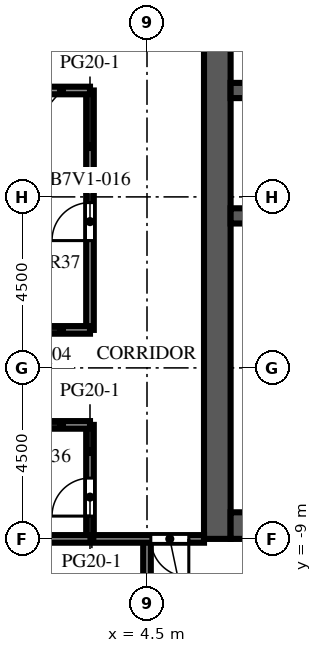
"""IFC4 building model, lengths in metres.
Left out: names, types, materials, properties, quantities, classifications, styles, units other than length and angle.
Written with IfcOpenShell. Run it as: python <this file> out.ifc"""

import sys

from ifc_helpers import new_model, si_unit, direction, frame, frame_2d, origin, place, context, subcontext, project, spatial, rectangle, extrude, element, fill, save


model = new_model("IFC4")
c1 = context("Model", 3, precision=1e-05, world=origin(), true_north=direction((0.0, 1.0)))
c2 = subcontext(c1, "Body", "Model", "MODEL_VIEW")
j1 = project(units=[si_unit("LENGTHUNIT", "METRE"), si_unit("PLANEANGLEUNIT", "RADIAN")], contexts=[c1])
p1 = place(None, origin())
s1 = spatial("IfcSite", under=j1, at=p1, CompositionType="ELEMENT")
p2 = place(p1, origin())
s2 = spatial("IfcBuilding", under=s1, at=p2, CompositionType="ELEMENT")
p3 = place(p2, frame((0.0, 0.0, 248.0)))
s3 = spatial("IfcBuildingStorey", under=s2, at=p3, CompositionType="ELEMENT", Elevation=248.0)
p4 = place(p3, frame((6.35, -9.0, 0.0), z_axis=(0.0, 0.0, 1.0), x_axis=(0.0, 1.0, 0.0)))
e1 = element("IfcWall", 1, at=p4, inside=s3, PredefinedType="SHEAR", context=c2, shape_type="SweptSolid", body=[
    extrude(rectangle(XDim=27.5, YDim=0.7, at=frame_2d((13.75, 0.0))), origin(), (0.0, 0.0, 1.0), 4.1),
])
p5 = place(p4, frame((12.55, 0.0, 0.0)))
e2 = element("IfcOpeningElement", 2, at=p5, cuts=e1, PredefinedType="OPENING", context=c2, shape_type="SweptSolid", body=[
    extrude(rectangle(XDim=2.4, YDim=2.4, at=frame_2d((1.2, 1.2))), frame((0.0, 0.36, 0.0), z_axis=(0.0, -1.0, 0.0), x_axis=(1.0, 0.0, 0.0)), (0.0, 0.0, 1.0), 0.72),
])
p6 = place(p4, frame((3.9, 0.0, 0.0)))
e3 = element("IfcOpeningElement", 3, at=p6, cuts=e1, PredefinedType="OPENING", context=c2, shape_type="SweptSolid", body=[
    extrude(rectangle(XDim=1.2, YDim=2.1, at=frame_2d((0.6, 1.05))), frame((0.0, 0.36, 0.0), z_axis=(0.0, -1.0, 0.0), x_axis=(1.0, 0.0, 0.0)), (0.0, 0.0, 1.0), 0.72),
])
p7 = place(p4, frame((22.4, 0.0, 0.0)))
e4 = element("IfcOpeningElement", 4, at=p7, cuts=e1, PredefinedType="OPENING", context=c2, shape_type="SweptSolid", body=[
    extrude(rectangle(XDim=1.2, YDim=2.1, at=frame_2d((0.6, 1.05))), frame((0.0, 0.36, 0.0), z_axis=(0.0, -1.0, 0.0), x_axis=(1.0, 0.0, 0.0)), (0.0, 0.0, 1.0), 0.72),
])
p8 = place(p3, frame((6.7, -8.65, 0.0), z_axis=(0.0, 0.0, 1.0), x_axis=(1.0, 0.0, 0.0)))
e5 = element("IfcWall", 5, at=p8, inside=s3, PredefinedType="SHEAR", context=c2, shape_type="SweptSolid", body=[
    extrude(rectangle(XDim=10.6, YDim=0.7, at=frame_2d((5.3, 0.0))), origin(), (0.0, 0.0, 1.0), 4.1),
])
p9 = place(p3, frame((6.7, -0.5, 0.0), z_axis=(0.0, 0.0, 1.0), x_axis=(1.0, 0.0, 0.0)))
e6 = element("IfcWall", 6, at=p9, inside=s3, PredefinedType="SHEAR", context=c2, shape_type="SweptSolid", body=[
    extrude(rectangle(XDim=10.6, YDim=0.4, at=frame_2d((5.3, 0.0))), origin(), (0.0, 0.0, 1.0), 4.1),
])
p10 = place(p3, frame((6.7, 2.8, 0.0), z_axis=(0.0, 0.0, 1.0), x_axis=(1.0, 0.0, 0.0)))
e7 = element("IfcWall", 7, at=p10, inside=s3, PredefinedType="SHEAR", context=c2, shape_type="SweptSolid", body=[
    extrude(rectangle(XDim=10.6, YDim=0.4, at=frame_2d((5.3, 0.0))), origin(), (0.0, 0.0, 1.0), 4.1),
])
p11 = place(p10, frame((0.688, 0.0, 0.0)))
e8 = element("IfcOpeningElement", 8, at=p11, cuts=e7, PredefinedType="OPENING", context=c2, shape_type="SweptSolid", body=[
    extrude(rectangle(XDim=1.1, YDim=2.1, at=frame_2d((0.55, 1.05))), frame((0.0, 0.21, 0.0), z_axis=(0.0, -1.0, 0.0), x_axis=(1.0, 0.0, 0.0)), (0.0, 0.0, 1.0), 0.42),
])
p12 = place(p10, frame((3.438, 0.0, 0.0)))
e9 = element("IfcOpeningElement", 9, at=p12, cuts=e7, PredefinedType="OPENING", context=c2, shape_type="SweptSolid", body=[
    extrude(rectangle(XDim=1.1, YDim=2.1, at=frame_2d((0.55, 1.05))), frame((0.0, 0.21, 0.0), z_axis=(0.0, -1.0, 0.0), x_axis=(1.0, 0.0, 0.0)), (0.0, 0.0, 1.0), 0.42),
])
p13 = place(p10, frame((6.113, 0.0, 0.0)))
e10 = element("IfcOpeningElement", 10, at=p13, cuts=e7, PredefinedType="OPENING", context=c2, shape_type="SweptSolid", body=[
    extrude(rectangle(XDim=1.0, YDim=2.1, at=frame_2d((0.5, 1.05))), frame((0.0, 0.21, 0.0), z_axis=(0.0, -1.0, 0.0), x_axis=(1.0, 0.0, 0.0)), (0.0, 0.0, 1.0), 0.42),
])
p14 = place(p10, frame((8.863, 0.0, 0.0)))
e11 = element("IfcOpeningElement", 11, at=p14, cuts=e7, PredefinedType="OPENING", context=c2, shape_type="SweptSolid", body=[
    extrude(rectangle(XDim=1.0, YDim=2.1, at=frame_2d((0.5, 1.05))), frame((0.0, 0.21, 0.0), z_axis=(0.0, -1.0, 0.0), x_axis=(1.0, 0.0, 0.0)), (0.0, 0.0, 1.0), 0.42),
])
p15 = place(p3, frame((3.0, -9.0, 0.0), z_axis=(0.0, 0.0, 1.0), x_axis=(0.0, 1.0, 0.0)))
e12 = element("IfcWall", 12, at=p15, inside=s3, PredefinedType="PARTITIONING", context=c2, shape_type="SweptSolid", body=[
    extrude(rectangle(XDim=3.0, YDim=0.2, at=frame_2d((1.5, 0.0))), origin(), (0.0, 0.0, 1.0), 3.65),
])
p16 = place(p15, frame((0.6, 0.0, 0.0)))
e13 = element("IfcOpeningElement", 13, at=p16, cuts=e12, PredefinedType="OPENING", context=c2, shape_type="SweptSolid", body=[
    extrude(rectangle(XDim=1.0, YDim=2.1, at=frame_2d((0.5, 1.05))), frame((0.0, 0.11, 0.0), z_axis=(0.0, -1.0, 0.0), x_axis=(1.0, 0.0, 0.0)), (0.0, 0.0, 1.0), 0.22),
])
p17 = place(p3, frame((3.0, -3.5, 0.0), z_axis=(0.0, 0.0, 1.0), x_axis=(0.0, 1.0, 0.0)))
e14 = element("IfcWall", 14, at=p17, inside=s3, PredefinedType="PARTITIONING", context=c2, shape_type="SweptSolid", body=[
    extrude(rectangle(XDim=6.3, YDim=0.2, at=frame_2d((3.15, 0.0))), origin(), (0.0, 0.0, 1.0), 3.65),
])
p18 = place(p17, frame((2.35, 0.0, 0.0)))
e15 = element("IfcOpeningElement", 15, at=p18, cuts=e14, PredefinedType="OPENING", context=c2, shape_type="SweptSolid", body=[
    extrude(rectangle(XDim=1.0, YDim=2.1, at=frame_2d((0.5, 1.05))), frame((0.0, 0.11, 0.0), z_axis=(0.0, -1.0, 0.0), x_axis=(1.0, 0.0, 0.0)), (0.0, 0.0, 1.0), 0.22),
])
p19 = place(p3, frame((4.5, -22.1, 0.0), z_axis=(0.0, 0.0, 1.0), x_axis=(0.0, 1.0, 0.0)))
e16 = element("IfcWall", 16, at=p19, inside=s3, PredefinedType="PARTITIONING", context=c2, shape_type="SweptSolid", body=[
    extrude(rectangle(XDim=13.1, YDim=0.2, at=frame_2d((6.55, 0.0))), origin(), (0.0, 0.0, 1.0), 3.65),
])
p20 = place(p3, frame((6.0, -9.0, 0.0), z_axis=(0.0, 0.0, 1.0), x_axis=(-1.0, 0.0, 0.0)))
e17 = element("IfcWall", 17, at=p20, inside=s3, PredefinedType="PARTITIONING", context=c2, shape_type="SweptSolid", body=[
    extrude(rectangle(XDim=4.5, YDim=0.2, at=frame_2d((2.25, 0.0))), origin(), (0.0, 0.0, 1.0), 3.65),
])
p21 = place(p20, frame((0.4, 0.0, 0.0)))
e18 = element("IfcOpeningElement", 18, at=p21, cuts=e17, PredefinedType="OPENING", context=c2, shape_type="SweptSolid", body=[
    extrude(rectangle(XDim=1.0, YDim=2.1, at=frame_2d((0.5, 1.05))), frame((0.0, 0.11, 0.0), z_axis=(0.0, -1.0, 0.0), x_axis=(1.0, 0.0, 0.0)), (0.0, 0.0, 1.0), 0.22),
])
for number, where, z_axis, x_axis in (
    (19, (1.5, -6.0, 0.0), (0.0, 0.0, 1.0), (1.0, 0.0, 0.0)),
    (20, (1.5, -3.5, 0.0), (0.0, 0.0, 1.0), (1.0, 0.0, 0.0)),
    (21, (1.5, 2.8, 0.0), (0.0, 0.0, 1.0), (1.0, 0.0, 0.0)),
):
    element("IfcWall", number, at=place(p3, frame(where, z_axis=z_axis, x_axis=x_axis)), inside=s3, PredefinedType="PARTITIONING", context=c2, shape_type="SweptSolid", body=[
        extrude(rectangle(XDim=1.5, YDim=0.2, at=frame_2d((0.75, 0.0))), origin(), (0.0, 0.0, 1.0), 3.65),
    ])
p22 = place(p5, origin())
e22 = element("IfcDoor", 22, at=p22, inside=s3, OperationType="DOUBLE_DOOR_DOUBLE_SWING", PredefinedType="DOOR", context=c2, shape_type="SweptSolid", body=[
    extrude(rectangle(XDim=2.4, YDim=2.4, at=frame_2d((1.2, 1.2))), frame((0.0, 0.025, 0.0), z_axis=(0.0, -1.0, 0.0), x_axis=(1.0, 0.0, 0.0)), (0.0, 0.0, 1.0), 0.05),
])
fill(e2, e22)
p23 = place(p6, origin())
e23 = element("IfcDoor", 23, at=p23, inside=s3, OperationType="SINGLE_SWING_RIGHT", PredefinedType="DOOR", context=c2, shape_type="SweptSolid", body=[
    extrude(rectangle(XDim=1.2, YDim=2.1, at=frame_2d((0.6, 1.05))), frame((0.0, -0.275, 0.0), z_axis=(0.0, -1.0, 0.0), x_axis=(1.0, 0.0, 0.0)), (0.0, 0.0, 1.0), 0.05),
])
fill(e3, e23)
p24 = place(p21, origin())
e24 = element("IfcDoor", 24, at=p24, inside=s3, OperationType="SINGLE_SWING_LEFT", PredefinedType="DOOR", context=c2, shape_type="SweptSolid", body=[
    extrude(rectangle(XDim=1.0, YDim=2.1, at=frame_2d((0.5, 1.05))), frame((0.0, 0.025, 0.0), z_axis=(0.0, -1.0, 0.0), x_axis=(1.0, 0.0, 0.0)), (0.0, 0.0, 1.0), 0.05),
])
fill(e18, e24)
p25 = place(p16, origin())
e25 = element("IfcDoor", 25, at=p25, inside=s3, OperationType="SINGLE_SWING_LEFT", PredefinedType="DOOR", context=c2, shape_type="SweptSolid", body=[
    extrude(rectangle(XDim=1.0, YDim=2.1, at=frame_2d((0.5, 1.05))), frame((0.0, 0.025, 0.0), z_axis=(0.0, -1.0, 0.0), x_axis=(1.0, 0.0, 0.0)), (0.0, 0.0, 1.0), 0.05),
])
fill(e13, e25)
p26 = place(p18, origin())
e26 = element("IfcDoor", 26, at=p26, inside=s3, OperationType="SINGLE_SWING_LEFT", PredefinedType="DOOR", context=c2, shape_type="SweptSolid", body=[
    extrude(rectangle(XDim=1.0, YDim=2.1, at=frame_2d((0.5, 1.05))), frame((0.0, 0.025, 0.0), z_axis=(0.0, -1.0, 0.0), x_axis=(1.0, 0.0, 0.0)), (0.0, 0.0, 1.0), 0.05),
])
fill(e15, e26)
save(model, sys.argv[1])
